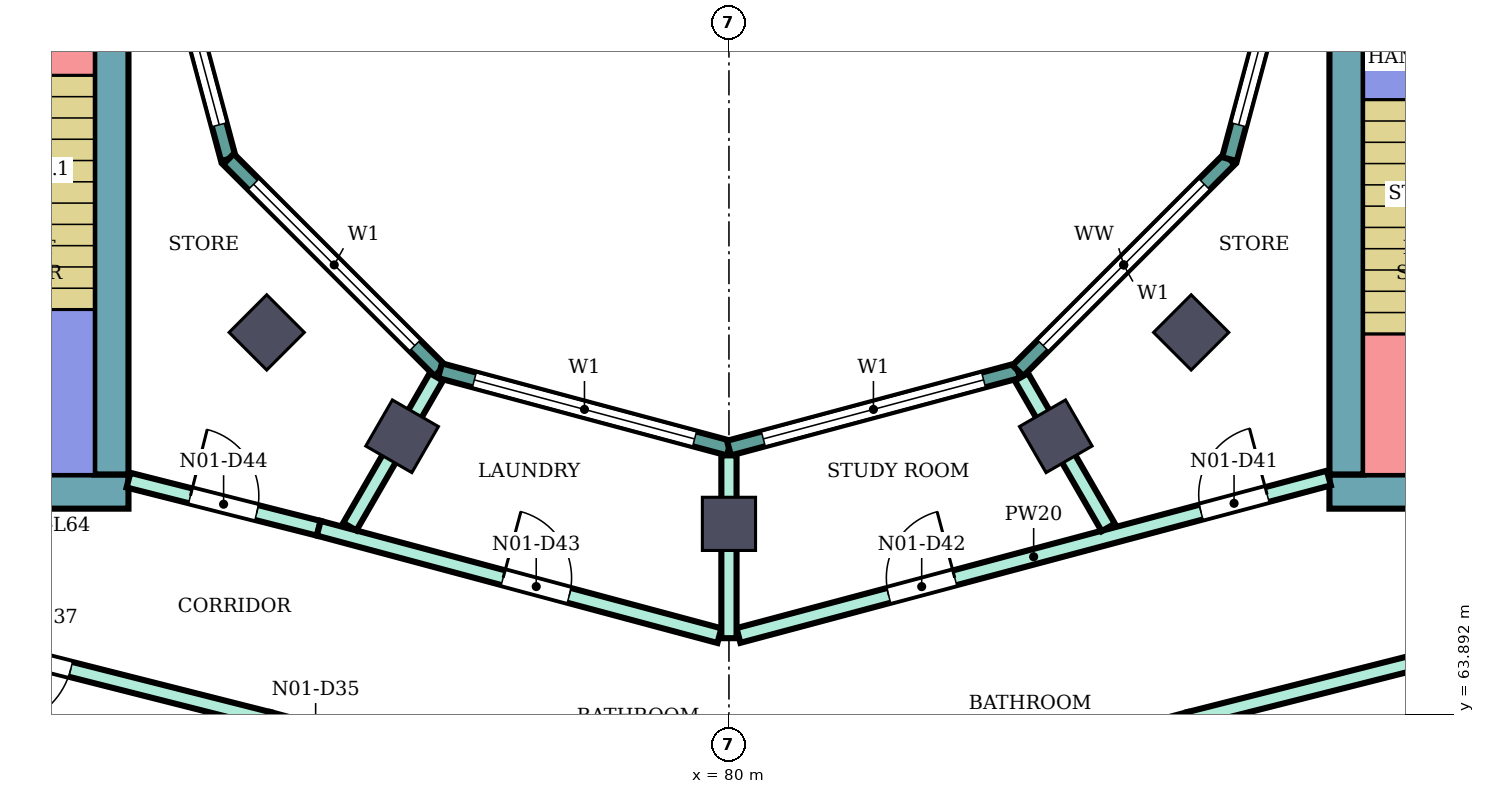
"""IFC4 building model, lengths in metres.
Left out: names, types, materials, properties, quantities, classifications, styles, units other than length and angle.
Written with IfcOpenShell. Run it as: python <this file> out.ifc"""

import sys

from ifc_helpers import new_model, si_unit, direction, frame, frame_2d, origin, origin_2d, place, context, subcontext, project, spatial, rectangle, extrude, element, fill, save


model = new_model("IFC4")
c1 = context("Model", 3, precision=1e-05, world=origin(), true_north=direction((0.0, 1.0)))
c2 = subcontext(c1, "Body", "Model", "MODEL_VIEW")
j1 = project(units=[si_unit("LENGTHUNIT", "METRE"), si_unit("PLANEANGLEUNIT", "RADIAN")], contexts=[c1])
p1 = place(None, origin())
s1 = spatial("IfcSite", under=j1, at=p1, CompositionType="ELEMENT")
p2 = place(p1, origin())
s2 = spatial("IfcBuilding", under=s1, at=p2, CompositionType="ELEMENT")
p3 = place(p2, frame((0.0, 0.0, 279.9)))
s3 = spatial("IfcBuildingStorey", under=s2, at=p3, CompositionType="ELEMENT", Elevation=279.9)
for number, where, z_axis, x_axis in (
    (1, (73.919, 68.919, 0.0), (0.0, 0.0, 1.0), (-0.707, -0.707, 0.0)),
    (2, (75.7, 67.552, 0.0), (0.0, 0.0, 1.0), (-0.5, -0.866, 0.0)),
    (3, (80.0, 66.4, 0.0), (0.0, 0.0, 1.0), (0.0, -1.0, 0.0)),
    (4, (84.3, 67.552, 0.0), (0.0, 0.0, 1.0), (0.5, -0.866, 0.0)),
    (5, (86.081, 68.919, 0.0), (0.0, 0.0, 1.0), (0.707, -0.707, 0.0)),
):
    element("IfcColumn", number, at=place(p3, frame(where, z_axis=z_axis, x_axis=x_axis)), inside=s3, PredefinedType="COLUMN", context=c2, shape_type="SweptSolid", body=[
        extrude(rectangle(XDim=0.7, YDim=0.7, at=origin_2d()), origin(), (0.0, 0.0, 1.0), 4.2),
    ])
p4 = place(p3, frame((87.9, 66.825, 0.0), z_axis=(0.0, 0.0, 1.0), x_axis=(1.0, 0.0, 0.0)))
e6 = element("IfcWall", 6, at=p4, inside=s3, PredefinedType="SHEAR", context=c2, shape_type="SweptSolid", body=[
    extrude(rectangle(XDim=13.55, YDim=0.45, at=frame_2d((6.775, 0.0))), origin(), (0.0, 0.0, 1.0), 3.88),
])
p5 = place(p4, frame((4.2, 0.0, 0.0)))
e7 = element("IfcOpeningElement", 7, at=p5, cuts=e6, PredefinedType="OPENING", context=c2, shape_type="SweptSolid", body=[
    extrude(rectangle(XDim=2.4, YDim=2.4, at=frame_2d((1.2, 1.2))), frame((0.0, 0.235, 0.0), z_axis=(0.0, -1.0, 0.0), x_axis=(1.0, 0.0, 0.0)), (0.0, 0.0, 1.0), 0.47),
])
p6 = place(p3, frame((88.125, 67.05, 0.0), z_axis=(0.0, 0.0, 1.0), x_axis=(0.0, 1.0, 0.0)))
e8 = element("IfcWall", 8, at=p6, inside=s3, PredefinedType="SHEAR", context=c2, shape_type="SweptSolid", body=[
    extrude(rectangle(XDim=7.95, YDim=0.45, at=frame_2d((3.975, 0.0))), origin(), (0.0, 0.0, 1.0), 3.88),
])
p7 = place(p3, frame((72.1, 66.825, 0.0), z_axis=(0.0, 0.0, 1.0), x_axis=(-1.0, 0.0, 0.0)))
e9 = element("IfcWall", 9, at=p7, inside=s3, PredefinedType="SHEAR", context=c2, shape_type="SweptSolid", body=[
    extrude(rectangle(XDim=13.55, YDim=0.45, at=frame_2d((6.775, 0.0))), origin(), (0.0, 0.0, 1.0), 3.88),
])
p8 = place(p7, frame((4.2, 0.0, 0.0)))
e10 = element("IfcOpeningElement", 10, at=p8, cuts=e9, PredefinedType="OPENING", context=c2, shape_type="SweptSolid", body=[
    extrude(rectangle(XDim=2.4, YDim=2.4, at=frame_2d((1.2, 1.2))), frame((0.0, 0.235, 0.0), z_axis=(0.0, -1.0, 0.0), x_axis=(1.0, 0.0, 0.0)), (0.0, 0.0, 1.0), 0.47),
])
p9 = place(p3, frame((71.875, 75.0, 0.0), z_axis=(0.0, 0.0, 1.0), x_axis=(0.0, -1.0, 0.0)))
e11 = element("IfcWall", 11, at=p9, inside=s3, PredefinedType="SHEAR", context=c2, shape_type="SweptSolid", body=[
    extrude(rectangle(XDim=7.95, YDim=0.45, at=frame_2d((3.975, 0.0))), origin(), (0.0, 0.0, 1.0), 3.88),
])
p10 = place(p3, frame((72.396, 75.0, 0.0), z_axis=(0.0, 0.0, 1.0), x_axis=(0.258789828301, -0.965933654434, 0.0)))
e12 = element("IfcWall", 12, at=p10, inside=s3, PredefinedType="NOTDEFINED", context=c2, shape_type="SweptSolid", body=[
    extrude(rectangle(XDim=3.936, YDim=0.2, at=frame_2d((1.968, 0.0))), origin(), (0.0, 0.0, 1.0), 4.2),
])
p11 = place(p10, frame((0.468, 0.0, 0.9)))
e13 = element("IfcOpeningElement", 13, at=p11, cuts=e12, PredefinedType="OPENING", context=c2, shape_type="SweptSolid", body=[
    extrude(rectangle(XDim=3.0, YDim=2.3, at=frame_2d((1.5, 1.15))), frame((0.0, 0.11, 0.0), z_axis=(0.0, -1.0, 0.0), x_axis=(1.0, 0.0, 0.0)), (0.0, 0.0, 1.0), 0.22),
])
p12 = place(p3, frame((73.415, 71.198, 0.0), z_axis=(0.0, 0.0, 1.0), x_axis=(0.707106781187, -0.707106781187, 0.0)))
e14 = element("IfcWall", 14, at=p12, inside=s3, PredefinedType="NOTDEFINED", context=c2, shape_type="SweptSolid", body=[
    extrude(rectangle(XDim=3.936, YDim=0.2, at=frame_2d((1.968, 0.0))), origin(), (0.0, 0.0, 1.0), 4.2),
])
p13 = place(p12, frame((0.468, 0.0, 0.9)))
e15 = element("IfcOpeningElement", 15, at=p13, cuts=e14, PredefinedType="OPENING", context=c2, shape_type="SweptSolid", body=[
    extrude(rectangle(XDim=3.0, YDim=2.3, at=frame_2d((1.5, 1.15))), frame((0.0, 0.11, 0.0), z_axis=(0.0, -1.0, 0.0), x_axis=(1.0, 0.0, 0.0)), (0.0, 0.0, 1.0), 0.22),
])
p14 = place(p3, frame((76.198, 68.415, 0.0), z_axis=(0.0, 0.0, 1.0), x_axis=(0.965933654434, -0.258789828301, 0.0)))
e16 = element("IfcWall", 16, at=p14, inside=s3, PredefinedType="NOTDEFINED", context=c2, shape_type="SweptSolid", body=[
    extrude(rectangle(XDim=3.936, YDim=0.2, at=frame_2d((1.968, 0.0))), origin(), (0.0, 0.0, 1.0), 4.2),
])
p15 = place(p14, frame((0.468, 0.0, 0.9)))
e17 = element("IfcOpeningElement", 17, at=p15, cuts=e16, PredefinedType="OPENING", context=c2, shape_type="SweptSolid", body=[
    extrude(rectangle(XDim=3.0, YDim=2.3, at=frame_2d((1.5, 1.15))), frame((0.0, 0.11, 0.0), z_axis=(0.0, -1.0, 0.0), x_axis=(1.0, 0.0, 0.0)), (0.0, 0.0, 1.0), 0.22),
])
p16 = place(p3, frame((80.0, 67.396, 0.0), z_axis=(0.0, 0.0, 1.0), x_axis=(0.965933654434, 0.258789828301, 0.0)))
e18 = element("IfcWall", 18, at=p16, inside=s3, PredefinedType="NOTDEFINED", context=c2, shape_type="SweptSolid", body=[
    extrude(rectangle(XDim=3.936, YDim=0.2, at=frame_2d((1.968, 0.0))), origin(), (0.0, 0.0, 1.0), 4.2),
])
p17 = place(p16, frame((0.468, 0.0, 0.9)))
e19 = element("IfcOpeningElement", 19, at=p17, cuts=e18, PredefinedType="OPENING", context=c2, shape_type="SweptSolid", body=[
    extrude(rectangle(XDim=3.0, YDim=2.3, at=frame_2d((1.5, 1.15))), frame((0.0, 0.11, 0.0), z_axis=(0.0, -1.0, 0.0), x_axis=(1.0, 0.0, 0.0)), (0.0, 0.0, 1.0), 0.22),
])
p18 = place(p3, frame((83.802, 68.415, 0.0), z_axis=(0.0, 0.0, 1.0), x_axis=(0.707106781187, 0.707106781187, 0.0)))
e20 = element("IfcWall", 20, at=p18, inside=s3, PredefinedType="NOTDEFINED", context=c2, shape_type="SweptSolid", body=[
    extrude(rectangle(XDim=3.936, YDim=0.2, at=frame_2d((1.968, 0.0))), origin(), (0.0, 0.0, 1.0), 4.2),
])
p19 = place(p18, frame((0.468, 0.0, 0.9)))
e21 = element("IfcOpeningElement", 21, at=p19, cuts=e20, PredefinedType="OPENING", context=c2, shape_type="SweptSolid", body=[
    extrude(rectangle(XDim=3.0, YDim=2.3, at=frame_2d((1.5, 1.15))), frame((0.0, 0.11, 0.0), z_axis=(0.0, -1.0, 0.0), x_axis=(1.0, 0.0, 0.0)), (0.0, 0.0, 1.0), 0.22),
])
p20 = place(p3, frame((86.585, 71.198, 0.0), z_axis=(0.0, 0.0, 1.0), x_axis=(0.258789828301, 0.965933654434, 0.0)))
e22 = element("IfcWall", 22, at=p20, inside=s3, PredefinedType="NOTDEFINED", context=c2, shape_type="SweptSolid", body=[
    extrude(rectangle(XDim=3.936, YDim=0.2, at=frame_2d((1.968, 0.0))), origin(), (0.0, 0.0, 1.0), 4.2),
])
p21 = place(p20, frame((0.468, 0.0, 0.9)))
e23 = element("IfcOpeningElement", 23, at=p21, cuts=e22, PredefinedType="OPENING", context=c2, shape_type="SweptSolid", body=[
    extrude(rectangle(XDim=3.0, YDim=2.3, at=frame_2d((1.5, 1.15))), frame((0.0, 0.11, 0.0), z_axis=(0.0, -1.0, 0.0), x_axis=(1.0, 0.0, 0.0)), (0.0, 0.0, 1.0), 0.22),
])
p22 = place(p3, frame((68.2, 65.28, 0.0), z_axis=(0.0, 0.0, 1.0), x_axis=(0.969440802773, -0.24532535523, 0.0)))
e24 = element("IfcWall", 24, at=p22, inside=s3, PredefinedType="PARTITIONING", context=c2, shape_type="SweptSolid", body=[
    extrude(rectangle(XDim=5.928, YDim=0.2, at=frame_2d((2.964, 0.0))), origin(), (0.0, 0.0, 1.0), 3.75),
])
p23 = place(p22, frame((2.239, 0.0, 0.0)))
e25 = element("IfcOpeningElement", 25, at=p23, cuts=e24, PredefinedType="OPENING", context=c2, shape_type="SweptSolid", body=[
    extrude(rectangle(XDim=1.0, YDim=2.1, at=frame_2d((0.5, 1.05))), frame((0.0, 0.11, 0.0), z_axis=(0.0, -1.0, 0.0), x_axis=(1.0, 0.0, 0.0)), (0.0, 0.0, 1.0), 0.22),
])
p24 = place(p3, frame((72.1, 66.975, 0.0), z_axis=(0.0, 0.0, 1.0), x_axis=(0.969471314457, -0.245204752086, 0.0)))
e26 = element("IfcWall", 26, at=p24, inside=s3, PredefinedType="PARTITIONING", context=c2, shape_type="SweptSolid", body=[
    extrude(rectangle(XDim=2.582, YDim=0.2, at=frame_2d((1.291, 0.0))), origin(), (0.0, 0.0, 1.0), 3.75),
])
p25 = place(p24, frame((0.841, 0.0, 0.0)))
e27 = element("IfcOpeningElement", 27, at=p25, cuts=e26, PredefinedType="OPENING", context=c2, shape_type="SweptSolid", body=[
    extrude(rectangle(XDim=0.9, YDim=2.1, at=frame_2d((0.45, 1.05))), frame((0.0, 0.11, 0.0), z_axis=(0.0, -1.0, 0.0), x_axis=(1.0, 0.0, 0.0)), (0.0, 0.0, 1.0), 0.22),
])
p26 = place(p3, frame((73.947, 63.826, 0.0), z_axis=(0.0, 0.0, 1.0), x_axis=(0.965872508768, -0.25901794688, 0.0)))
e28 = element("IfcWall", 28, at=p26, inside=s3, PredefinedType="PARTITIONING", context=c2, shape_type="SweptSolid", body=[
    extrude(rectangle(XDim=6.177, YDim=0.2, at=frame_2d((3.088, 0.0))), origin(), (0.0, 0.0, 1.0), 3.75),
])
p27 = place(p26, frame((4.885, 0.0, 0.0)))
e29 = element("IfcOpeningElement", 29, at=p27, cuts=e28, PredefinedType="OPENING", context=c2, shape_type="SweptSolid", body=[
    extrude(rectangle(XDim=1.0, YDim=2.1, at=frame_2d((0.5, 1.05))), frame((0.0, 0.11, 0.0), z_axis=(0.0, -1.0, 0.0), x_axis=(1.0, 0.0, 0.0)), (0.0, 0.0, 1.0), 0.22),
])
p28 = place(p26, frame((0.137, 0.0, 0.0)))
e30 = element("IfcOpeningElement", 30, at=p28, cuts=e28, PredefinedType="OPENING", context=c2, shape_type="SweptSolid", body=[
    extrude(rectangle(XDim=1.0, YDim=2.1, at=frame_2d((0.5, 1.05))), frame((0.0, 0.11, 0.0), z_axis=(0.0, -1.0, 0.0), x_axis=(1.0, 0.0, 0.0)), (0.0, 0.0, 1.0), 0.22),
])
p29 = place(p3, frame((74.603, 66.342, 0.0), z_axis=(0.0, 0.0, 1.0), x_axis=(0.965920893652, -0.258837453254, 0.0)))
e31 = element("IfcWall", 31, at=p29, inside=s3, PredefinedType="PARTITIONING", context=c2, shape_type="SweptSolid", body=[
    extrude(rectangle(XDim=5.458, YDim=0.2, at=frame_2d((2.729, 0.0))), origin(), (0.0, 0.0, 1.0), 3.75),
])
p30 = place(p29, frame((2.512, 0.0, 0.0)))
e32 = element("IfcOpeningElement", 32, at=p30, cuts=e31, PredefinedType="OPENING", context=c2, shape_type="SweptSolid", body=[
    extrude(rectangle(XDim=0.9, YDim=2.1, at=frame_2d((0.45, 1.05))), frame((0.0, 0.11, 0.0), z_axis=(0.0, -1.0, 0.0), x_axis=(1.0, 0.0, 0.0)), (0.0, 0.0, 1.0), 0.22),
])
p31 = place(p3, frame((75.012, 66.363, 0.0), z_axis=(0.0, 0.0, 1.0), x_axis=(0.500097042406, 0.865969369075, 0.0)))
e33 = element("IfcWall", 33, at=p31, inside=s3, PredefinedType="PARTITIONING", context=c2, shape_type="SweptSolid", body=[
    extrude(rectangle(XDim=2.275, YDim=0.2, at=frame_2d((1.138, 0.0))), origin(), (0.0, 0.0, 1.0), 3.75),
])
p32 = place(p3, frame((80.125, 64.932, 0.0), z_axis=(0.0, 0.0, 1.0), x_axis=(0.966236955806, 0.257655089674, 0.0)))
e34 = element("IfcWall", 34, at=p32, inside=s3, PredefinedType="PARTITIONING", context=c2, shape_type="SweptSolid", body=[
    extrude(rectangle(XDim=8.039, YDim=0.2, at=frame_2d((4.02, 0.0))), origin(), (0.0, 0.0, 1.0), 3.75),
])
p33 = place(p32, frame((6.298, 0.0, 0.0)))
e35 = element("IfcOpeningElement", 35, at=p33, cuts=e34, PredefinedType="OPENING", context=c2, shape_type="SweptSolid", body=[
    extrude(rectangle(XDim=0.9, YDim=2.1, at=frame_2d((0.45, 1.05))), frame((0.0, 0.11, 0.0), z_axis=(0.0, -1.0, 0.0), x_axis=(1.0, 0.0, 0.0)), (0.0, 0.0, 1.0), 0.22),
])
p34 = place(p32, frame((2.045, 0.0, 0.0)))
e36 = element("IfcOpeningElement", 36, at=p34, cuts=e34, PredefinedType="OPENING", context=c2, shape_type="SweptSolid", body=[
    extrude(rectangle(XDim=0.9, YDim=2.1, at=frame_2d((0.45, 1.05))), frame((0.0, 0.11, 0.0), z_axis=(0.0, -1.0, 0.0), x_axis=(1.0, 0.0, 0.0)), (0.0, 0.0, 1.0), 0.22),
])
p35 = place(p3, frame((80.0, 62.204, 0.0), z_axis=(0.0, 0.0, 1.0), x_axis=(0.965960221635, 0.258690645788, 0.0)))
e37 = element("IfcWall", 37, at=p35, inside=s3, PredefinedType="PARTITIONING", context=c2, shape_type="SweptSolid", body=[
    extrude(rectangle(XDim=6.267, YDim=0.2, at=frame_2d((3.133, 0.0))), origin(), (0.0, 0.0, 1.0), 3.75),
])
p36 = place(p35, frame((0.382, 0.0, 0.0)))
e38 = element("IfcOpeningElement", 38, at=p36, cuts=e37, PredefinedType="OPENING", context=c2, shape_type="SweptSolid", body=[
    extrude(rectangle(XDim=1.0, YDim=2.1, at=frame_2d((0.5, 1.05))), frame((0.0, 0.11, 0.0), z_axis=(0.0, -1.0, 0.0), x_axis=(1.0, 0.0, 0.0)), (0.0, 0.0, 1.0), 0.22),
])
p37 = place(p3, frame((80.0, 64.896, 0.0), z_axis=(0.0, 0.0, 1.0), x_axis=(0.0, 1.0, 0.0)))
e39 = element("IfcWall", 39, at=p37, inside=s3, PredefinedType="PARTITIONING", context=c2, shape_type="SweptSolid", body=[
    extrude(rectangle(XDim=2.405, YDim=0.2, at=frame_2d((1.203, 0.0))), origin(), (0.0, 0.0, 1.0), 3.75),
])
p38 = place(p3, frame((83.848, 68.332, 0.0), z_axis=(0.0, 0.0, 1.0), x_axis=(0.499953638813, -0.866052168773, 0.0)))
e40 = element("IfcWall", 40, at=p38, inside=s3, PredefinedType="PARTITIONING", context=c2, shape_type="SweptSolid", body=[
    extrude(rectangle(XDim=2.285, YDim=0.2, at=frame_2d((1.143, 0.0))), origin(), (0.0, 0.0, 1.0), 3.75),
])
p39 = place(p3, frame((86.053, 63.826, 0.0), z_axis=(0.0, 0.0, 1.0), x_axis=(0.969490004987, 0.245130843083, 0.0)))
e41 = element("IfcWall", 41, at=p39, inside=s3, PredefinedType="PARTITIONING", context=c2, shape_type="SweptSolid", body=[
    extrude(rectangle(XDim=5.908, YDim=0.2, at=frame_2d((2.954, 0.0))), origin(), (0.0, 0.0, 1.0), 3.75),
])
p40 = place(p11, origin())
e42 = element("IfcWindow", 42, at=p40, inside=s3, PartitioningType="SINGLE_PANEL", PredefinedType="WINDOW", context=c2, shape_type="SweptSolid", body=[
    extrude(rectangle(XDim=3.0, YDim=2.3, at=frame_2d((1.5, 1.15))), frame((0.0, 0.03, 0.0), z_axis=(0.0, -1.0, 0.0), x_axis=(1.0, 0.0, 0.0)), (0.0, 0.0, 1.0), 0.06),
])
fill(e13, e42)
p41 = place(p13, origin())
e43 = element("IfcWindow", 43, at=p41, inside=s3, PartitioningType="SINGLE_PANEL", PredefinedType="WINDOW", context=c2, shape_type="SweptSolid", body=[
    extrude(rectangle(XDim=3.0, YDim=2.3, at=frame_2d((1.5, 1.15))), frame((0.0, 0.03, 0.0), z_axis=(0.0, -1.0, 0.0), x_axis=(1.0, 0.0, 0.0)), (0.0, 0.0, 1.0), 0.06),
])
fill(e15, e43)
p42 = place(p15, origin())
e44 = element("IfcWindow", 44, at=p42, inside=s3, PartitioningType="SINGLE_PANEL", PredefinedType="WINDOW", context=c2, shape_type="SweptSolid", body=[
    extrude(rectangle(XDim=3.0, YDim=2.3, at=frame_2d((1.5, 1.15))), frame((0.0, 0.03, 0.0), z_axis=(0.0, -1.0, 0.0), x_axis=(1.0, 0.0, 0.0)), (0.0, 0.0, 1.0), 0.06),
])
fill(e17, e44)
p43 = place(p17, origin())
e45 = element("IfcWindow", 45, at=p43, inside=s3, PartitioningType="SINGLE_PANEL", PredefinedType="WINDOW", context=c2, shape_type="SweptSolid", body=[
    extrude(rectangle(XDim=3.0, YDim=2.3, at=frame_2d((1.5, 1.15))), frame((0.0, 0.03, 0.0), z_axis=(0.0, -1.0, 0.0), x_axis=(1.0, 0.0, 0.0)), (0.0, 0.0, 1.0), 0.06),
])
fill(e19, e45)
p44 = place(p19, origin())
e46 = element("IfcWindow", 46, at=p44, inside=s3, PartitioningType="SINGLE_PANEL", PredefinedType="WINDOW", context=c2, shape_type="SweptSolid", body=[
    extrude(rectangle(XDim=3.0, YDim=2.3, at=frame_2d((1.5, 1.15))), frame((0.0, 0.03, 0.0), z_axis=(0.0, -1.0, 0.0), x_axis=(1.0, 0.0, 0.0)), (0.0, 0.0, 1.0), 0.06),
])
fill(e21, e46)
p45 = place(p21, origin())
e47 = element("IfcWindow", 47, at=p45, inside=s3, PartitioningType="SINGLE_PANEL", PredefinedType="WINDOW", context=c2, shape_type="SweptSolid", body=[
    extrude(rectangle(XDim=3.0, YDim=2.3, at=frame_2d((1.5, 1.15))), frame((0.0, 0.03, 0.0), z_axis=(0.0, -1.0, 0.0), x_axis=(1.0, 0.0, 0.0)), (0.0, 0.0, 1.0), 0.06),
])
fill(e23, e47)
p46 = place(p23, frame((1.0, 0.0, 0.0), z_axis=(0.0, 0.0, 1.0), x_axis=(-1.0, 0.0, 0.0)))
e48 = element("IfcDoor", 48, at=p46, inside=s3, OperationType="SINGLE_SWING_RIGHT", PredefinedType="DOOR", context=c2, shape_type="SweptSolid", body=[
    extrude(rectangle(XDim=1.0, YDim=2.1, at=frame_2d((0.5, 1.05))), frame((0.0, 0.025, 0.0), z_axis=(0.0, -1.0, 0.0), x_axis=(1.0, 0.0, 0.0)), (0.0, 0.0, 1.0), 0.05),
])
fill(e25, e48)
p47 = place(p33, origin())
e49 = element("IfcDoor", 49, at=p47, inside=s3, OperationType="SINGLE_SWING_RIGHT", PredefinedType="DOOR", context=c2, shape_type="SweptSolid", body=[
    extrude(rectangle(XDim=0.9, YDim=2.1, at=frame_2d((0.45, 1.05))), frame((0.0, 0.025, 0.0), z_axis=(0.0, -1.0, 0.0), x_axis=(1.0, 0.0, 0.0)), (0.0, 0.0, 1.0), 0.05),
])
fill(e35, e49)
p48 = place(p34, origin())
e50 = element("IfcDoor", 50, at=p48, inside=s3, OperationType="SINGLE_SWING_RIGHT", PredefinedType="DOOR", context=c2, shape_type="SweptSolid", body=[
    extrude(rectangle(XDim=0.9, YDim=2.1, at=frame_2d((0.45, 1.05))), frame((0.0, 0.025, 0.0), z_axis=(0.0, -1.0, 0.0), x_axis=(1.0, 0.0, 0.0)), (0.0, 0.0, 1.0), 0.05),
])
fill(e36, e50)
p49 = place(p30, origin())
e51 = element("IfcDoor", 51, at=p49, inside=s3, OperationType="SINGLE_SWING_LEFT", PredefinedType="DOOR", context=c2, shape_type="SweptSolid", body=[
    extrude(rectangle(XDim=0.9, YDim=2.1, at=frame_2d((0.45, 1.05))), frame((0.0, 0.025, 0.0), z_axis=(0.0, -1.0, 0.0), x_axis=(1.0, 0.0, 0.0)), (0.0, 0.0, 1.0), 0.05),
])
fill(e32, e51)
p50 = place(p25, origin())
e52 = element("IfcDoor", 52, at=p50, inside=s3, OperationType="SINGLE_SWING_LEFT", PredefinedType="DOOR", context=c2, shape_type="SweptSolid", body=[
    extrude(rectangle(XDim=0.9, YDim=2.1, at=frame_2d((0.45, 1.05))), frame((0.0, 0.025, 0.0), z_axis=(0.0, -1.0, 0.0), x_axis=(1.0, 0.0, 0.0)), (0.0, 0.0, 1.0), 0.05),
])
fill(e27, e52)
save(model, sys.argv[1])
